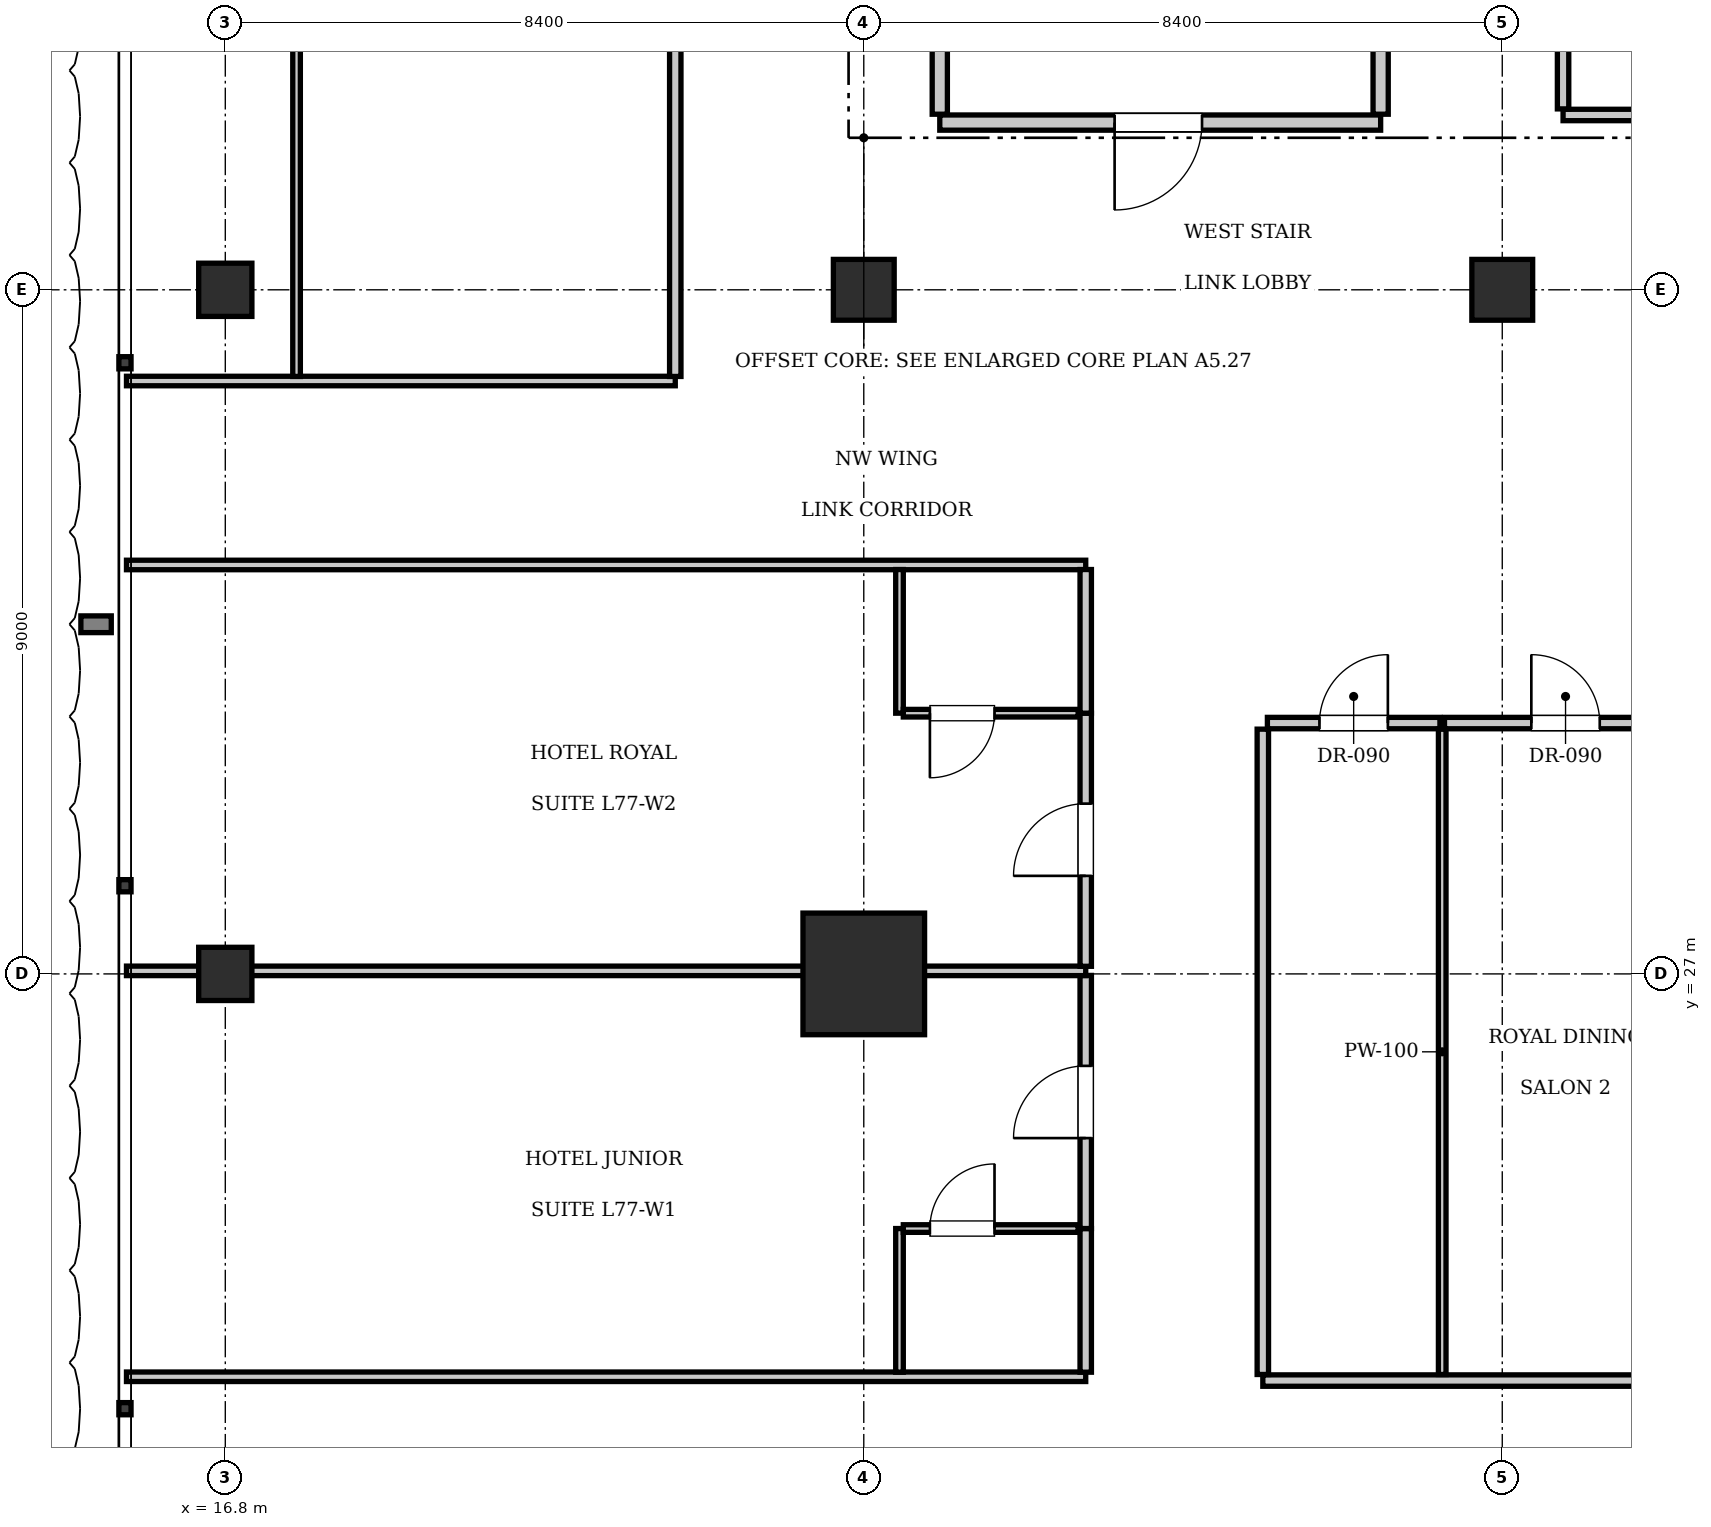
"""IFC4 building model, lengths in metres.
Left out: names, types, materials, properties, quantities, classifications, styles, units other than length and angle.
Written with IfcOpenShell. Run it as: python <this file> out.ifc"""

import sys

from ifc_helpers import new_model, si_unit, direction, frame, frame_2d, origin, origin_2d, place, context, subcontext, project, spatial, rectangle, extrude, element, fill, save


model = new_model("IFC4")
c1 = context("Model", 3, precision=1e-05, world=origin(), true_north=direction((0.0, 1.0)))
c2 = subcontext(c1, "Body", "Model", "MODEL_VIEW")
j1 = project(units=[si_unit("LENGTHUNIT", "METRE"), si_unit("PLANEANGLEUNIT", "RADIAN")], contexts=[c1])
p1 = place(None, origin())
s1 = spatial("IfcSite", under=j1, at=p1, CompositionType="ELEMENT")
p2 = place(p1, origin())
s2 = spatial("IfcBuilding", under=s1, at=p2, CompositionType="ELEMENT")
p3 = place(p2, frame((0.0, 0.0, 312.55)))
s3 = spatial("IfcBuildingStorey", under=s2, at=p3, CompositionType="ELEMENT", Elevation=312.55)
p4 = place(p3, frame((25.2, 27.0, 0.0), z_axis=(0.0, 0.0, 1.0), x_axis=(1.0, 0.0, 0.0)))
e1 = element("IfcColumn", 1, at=p4, inside=s3, PredefinedType="COLUMN", context=c2, shape_type="SweptSolid", body=[
    extrude(rectangle(XDim=1.6, YDim=1.6, at=origin_2d()), origin(), (0.0, 0.0, 1.0), 3.85),
])
for number, where, z_axis, x_axis in (
    (2, (25.2, 36.0, 0.0), (0.0, 0.0, 1.0), (1.0, 0.0, 0.0)),
    (3, (33.6, 36.0, 0.0), (0.0, 0.0, 1.0), (1.0, 0.0, 0.0)),
):
    element("IfcColumn", number, at=place(p3, frame(where, z_axis=z_axis, x_axis=x_axis)), inside=s3, PredefinedType="COLUMN", context=c2, shape_type="SweptSolid", body=[
        extrude(rectangle(XDim=0.8, YDim=0.8, at=origin_2d()), origin(), (0.0, 0.0, 1.0), 3.85),
    ])
for number, where, z_axis, x_axis in (
    (4, (16.8, 27.0, 0.0), (0.0, 0.0, 1.0), (1.0, 0.0, 0.0)),
    (5, (16.8, 36.0, 0.0), (0.0, 0.0, 1.0), (1.0, 0.0, 0.0)),
):
    element("IfcColumn", number, at=place(p3, frame(where, z_axis=z_axis, x_axis=x_axis)), inside=s3, PredefinedType="COLUMN", context=c2, shape_type="SweptSolid", body=[
        extrude(rectangle(XDim=0.7, YDim=0.7, at=origin_2d()), origin(), (0.0, 0.0, 1.0), 3.85),
    ])
p5 = place(p3, frame((26.2, 38.2, 0.0), z_axis=(0.0, 0.0, 1.0), x_axis=(1.0, 0.0, 0.0)))
e6 = element("IfcWall", 6, at=p5, inside=s3, PredefinedType="PARTITIONING", context=c2, shape_type="SweptSolid", body=[
    extrude(rectangle(XDim=5.8, YDim=0.2, at=frame_2d((2.9, 0.0))), origin(), (0.0, 0.0, 1.0), 3.55),
])
p6 = place(p5, frame((2.3, 0.0, 0.0)))
e7 = element("IfcOpeningElement", 7, at=p6, cuts=e6, PredefinedType="OPENING", context=c2, shape_type="SweptSolid", body=[
    extrude(rectangle(XDim=1.15, YDim=2.15, at=frame_2d((0.575, 1.075))), frame((0.0, 0.11, 0.0), z_axis=(0.0, -1.0, 0.0), x_axis=(1.0, 0.0, 0.0)), (0.0, 0.0, 1.0), 0.22),
])
for number, where, z_axis, x_axis in (
    (8, (26.2, 38.31, 0.0), (0.0, 0.0, 1.0), (0.0, 1.0, 0.0)),
    (9, (32.0, 38.31, 0.0), (0.0, 0.0, 1.0), (0.0, 1.0, 0.0)),
):
    element("IfcWall", number, at=place(p3, frame(where, z_axis=z_axis, x_axis=x_axis)), inside=s3, PredefinedType="PARTITIONING", context=c2, shape_type="SweptSolid", body=[
        extrude(rectangle(XDim=3.07, YDim=0.2, at=frame_2d((1.535, 0.0))), origin(), (0.0, 0.0, 1.0), 3.55),
    ])
p7 = place(p3, frame((34.4, 38.3, 0.0), z_axis=(0.0, 0.0, 1.0), x_axis=(1.0, 0.0, 0.0)))
e10 = element("IfcWall", 10, at=p7, inside=s3, PredefinedType="PARTITIONING", context=c2, shape_type="SweptSolid", body=[
    extrude(rectangle(XDim=2.88, YDim=0.15, at=frame_2d((1.44, 0.0))), origin(), (0.0, 0.0, 1.0), 3.55),
])
p8 = place(p7, frame((1.0, 0.0, 0.0)))
e11 = element("IfcOpeningElement", 11, at=p8, cuts=e10, PredefinedType="OPENING", context=c2, shape_type="SweptSolid", body=[
    extrude(rectangle(XDim=0.8, YDim=2.05, at=frame_2d((0.4, 1.025))), frame((0.0, 0.085, 0.0), z_axis=(0.0, -1.0, 0.0), x_axis=(1.0, 0.0, 0.0)), (0.0, 0.0, 1.0), 0.17),
])
p9 = place(p3, frame((34.4, 38.38, 0.0), z_axis=(0.0, 0.0, 1.0), x_axis=(0.0, 1.0, 0.0)))
e12 = element("IfcWall", 12, at=p9, inside=s3, PredefinedType="PARTITIONING", context=c2, shape_type="SweptSolid", body=[
    extrude(rectangle(XDim=2.84, YDim=0.15, at=frame_2d((1.42, 0.0))), origin(), (0.0, 0.0, 1.0), 3.55),
])
p10 = place(p3, frame((30.45, 21.65, 0.0), z_axis=(0.0, 0.0, 1.0), x_axis=(1.0, 0.0, 0.0)))
e13 = element("IfcWall", 13, at=p10, inside=s3, PredefinedType="PARTITIONING", context=c2, shape_type="SweptSolid", body=[
    extrude(rectangle(XDim=14.75, YDim=0.15, at=frame_2d((7.375, 0.0))), origin(), (0.0, 0.0, 1.0), 3.55),
])
p11 = place(p3, frame((30.45, 21.73, 0.0), z_axis=(0.0, 0.0, 1.0), x_axis=(0.0, 1.0, 0.0)))
e14 = element("IfcWall", 14, at=p11, inside=s3, PredefinedType="PARTITIONING", context=c2, shape_type="SweptSolid", body=[
    extrude(rectangle(XDim=8.49, YDim=0.15, at=frame_2d((4.245, 0.0))), origin(), (0.0, 0.0, 1.0), 3.55),
])
p12 = place(p3, frame((30.51, 30.3, 0.0), z_axis=(0.0, 0.0, 1.0), x_axis=(1.0, 0.0, 0.0)))
e15 = element("IfcWall", 15, at=p12, inside=s3, PredefinedType="PARTITIONING", context=c2, shape_type="SweptSolid", body=[
    extrude(rectangle(XDim=2.27, YDim=0.15, at=frame_2d((1.135, 0.0))), origin(), (0.0, 0.0, 1.0), 3.55),
])
p13 = place(p12, frame((0.685, 0.0, 0.0)))
e16 = element("IfcOpeningElement", 16, at=p13, cuts=e15, PredefinedType="OPENING", context=c2, shape_type="SweptSolid", body=[
    extrude(rectangle(XDim=0.9, YDim=2.1, at=frame_2d((0.45, 1.05))), frame((0.0, 0.085, 0.0), z_axis=(0.0, -1.0, 0.0), x_axis=(1.0, 0.0, 0.0)), (0.0, 0.0, 1.0), 0.17),
])
p14 = place(p3, frame((32.81, 21.73, 0.0), z_axis=(0.0, 0.0, 1.0), x_axis=(0.0, 1.0, 0.0)))
e17 = element("IfcWall", 17, at=p14, inside=s3, PredefinedType="PARTITIONING", context=c2, shape_type="SweptSolid", body=[
    extrude(rectangle(XDim=8.49, YDim=0.1, at=frame_2d((4.245, 0.0))), origin(), (0.0, 0.0, 1.0), 3.55),
])
p15 = place(p3, frame((32.84, 30.3, 0.0), z_axis=(0.0, 0.0, 1.0), x_axis=(1.0, 0.0, 0.0)))
e18 = element("IfcWall", 18, at=p15, inside=s3, PredefinedType="PARTITIONING", context=c2, shape_type="SweptSolid", body=[
    extrude(rectangle(XDim=3.185, YDim=0.15, at=frame_2d((1.592, 0.0))), origin(), (0.0, 0.0, 1.0), 3.55),
])
p16 = place(p15, frame((1.143, 0.0, 0.0)))
e19 = element("IfcOpeningElement", 19, at=p16, cuts=e18, PredefinedType="OPENING", context=c2, shape_type="SweptSolid", body=[
    extrude(rectangle(XDim=0.9, YDim=2.1, at=frame_2d((0.45, 1.05))), frame((0.0, 0.085, 0.0), z_axis=(0.0, -1.0, 0.0), x_axis=(1.0, 0.0, 0.0)), (0.0, 0.0, 1.0), 0.17),
])
for number, where, z_axis, x_axis in (
    (20, (15.5, 21.7, 0.0), (0.0, 0.0, 1.0), (1.0, 0.0, 0.0)),
    (21, (15.5, 32.38, 0.0), (0.0, 0.0, 1.0), (1.0, 0.0, 0.0)),
):
    element("IfcWall", number, at=place(p3, frame(where, z_axis=z_axis, x_axis=x_axis)), inside=s3, PredefinedType="PARTITIONING", context=c2, shape_type="SweptSolid", body=[
        extrude(rectangle(XDim=12.62, YDim=0.125, at=frame_2d((6.31, 0.0))), origin(), (0.0, 0.0, 1.0), 3.55),
    ])
p17 = place(p3, frame((28.12, 21.76, 0.0), z_axis=(0.0, 0.0, 1.0), x_axis=(0.0, 1.0, 0.0)))
e22 = element("IfcWall", 22, at=p17, inside=s3, PredefinedType="PARTITIONING", context=c2, shape_type="SweptSolid", body=[
    extrude(rectangle(XDim=1.89, YDim=0.15, at=frame_2d((0.945, 0.0))), origin(), (0.0, 0.0, 1.0), 3.55),
])
p18 = place(p3, frame((28.12, 23.65, 0.0), z_axis=(0.0, 0.0, 1.0), x_axis=(0.0, 1.0, 0.0)))
e23 = element("IfcWall", 23, at=p18, inside=s3, PredefinedType="PARTITIONING", context=c2, shape_type="SweptSolid", body=[
    extrude(rectangle(XDim=3.33, YDim=0.15, at=frame_2d((1.665, 0.0))), origin(), (0.0, 0.0, 1.0), 3.55),
])
p19 = place(p18, frame((1.19, 0.0, 0.0)))
e24 = element("IfcOpeningElement", 24, at=p19, cuts=e23, PredefinedType="OPENING", context=c2, shape_type="SweptSolid", body=[
    extrude(rectangle(XDim=0.95, YDim=2.15, at=frame_2d((0.475, 1.075))), frame((0.0, 0.085, 0.0), z_axis=(0.0, -1.0, 0.0), x_axis=(1.0, 0.0, 0.0)), (0.0, 0.0, 1.0), 0.17),
])
p20 = place(p3, frame((25.67, 21.76, 0.0), z_axis=(0.0, 0.0, 1.0), x_axis=(0.0, 1.0, 0.0)))
e25 = element("IfcWall", 25, at=p20, inside=s3, PredefinedType="PARTITIONING", context=c2, shape_type="SweptSolid", body=[
    extrude(rectangle(XDim=1.89, YDim=0.1, at=frame_2d((0.945, 0.0))), origin(), (0.0, 0.0, 1.0), 3.55),
])
p21 = place(p3, frame((25.72, 23.65, 0.0), z_axis=(0.0, 0.0, 1.0), x_axis=(1.0, 0.0, 0.0)))
e26 = element("IfcWall", 26, at=p21, inside=s3, PredefinedType="PARTITIONING", context=c2, shape_type="SweptSolid", body=[
    extrude(rectangle(XDim=2.3, YDim=0.1, at=frame_2d((1.15, 0.0))), origin(), (0.0, 0.0, 1.0), 3.55),
])
p22 = place(p21, frame((0.35, 0.0, 0.0)))
e27 = element("IfcOpeningElement", 27, at=p22, cuts=e26, PredefinedType="OPENING", context=c2, shape_type="SweptSolid", body=[
    extrude(rectangle(XDim=0.85, YDim=2.1, at=frame_2d((0.425, 1.05))), frame((0.0, 0.06, 0.0), z_axis=(0.0, -1.0, 0.0), x_axis=(1.0, 0.0, 0.0)), (0.0, 0.0, 1.0), 0.12),
])
p23 = place(p3, frame((15.5, 27.04, 0.0), z_axis=(0.0, 0.0, 1.0), x_axis=(1.0, 0.0, 0.0)))
e28 = element("IfcWall", 28, at=p23, inside=s3, PredefinedType="PARTITIONING", context=c2, shape_type="SweptSolid", body=[
    extrude(rectangle(XDim=12.62, YDim=0.125, at=frame_2d((6.31, 0.0))), origin(), (0.0, 0.0, 1.0), 2.35),
])
p24 = place(p3, frame((28.12, 27.1, 0.0), z_axis=(0.0, 0.0, 1.0), x_axis=(0.0, 1.0, 0.0)))
e29 = element("IfcWall", 29, at=p24, inside=s3, PredefinedType="PARTITIONING", context=c2, shape_type="SweptSolid", body=[
    extrude(rectangle(XDim=3.33, YDim=0.15, at=frame_2d((1.665, 0.0))), origin(), (0.0, 0.0, 1.0), 3.55),
])
p25 = place(p24, frame((1.19, 0.0, 0.0)))
e30 = element("IfcOpeningElement", 30, at=p25, cuts=e29, PredefinedType="OPENING", context=c2, shape_type="SweptSolid", body=[
    extrude(rectangle(XDim=0.95, YDim=2.15, at=frame_2d((0.475, 1.075))), frame((0.0, 0.085, 0.0), z_axis=(0.0, -1.0, 0.0), x_axis=(1.0, 0.0, 0.0)), (0.0, 0.0, 1.0), 0.17),
])
p26 = place(p3, frame((28.12, 30.43, 0.0), z_axis=(0.0, 0.0, 1.0), x_axis=(0.0, 1.0, 0.0)))
e31 = element("IfcWall", 31, at=p26, inside=s3, PredefinedType="PARTITIONING", context=c2, shape_type="SweptSolid", body=[
    extrude(rectangle(XDim=1.89, YDim=0.15, at=frame_2d((0.945, 0.0))), origin(), (0.0, 0.0, 1.0), 3.55),
])
p27 = place(p3, frame((25.67, 30.43, 0.0), z_axis=(0.0, 0.0, 1.0), x_axis=(0.0, 1.0, 0.0)))
e32 = element("IfcWall", 32, at=p27, inside=s3, PredefinedType="PARTITIONING", context=c2, shape_type="SweptSolid", body=[
    extrude(rectangle(XDim=1.89, YDim=0.1, at=frame_2d((0.945, 0.0))), origin(), (0.0, 0.0, 1.0), 3.55),
])
p28 = place(p3, frame((25.72, 30.43, 0.0), z_axis=(0.0, 0.0, 1.0), x_axis=(1.0, 0.0, 0.0)))
e33 = element("IfcWall", 33, at=p28, inside=s3, PredefinedType="PARTITIONING", context=c2, shape_type="SweptSolid", body=[
    extrude(rectangle(XDim=2.3, YDim=0.1, at=frame_2d((1.15, 0.0))), origin(), (0.0, 0.0, 1.0), 3.55),
])
p29 = place(p28, frame((0.35, 0.0, 0.0)))
e34 = element("IfcOpeningElement", 34, at=p29, cuts=e33, PredefinedType="OPENING", context=c2, shape_type="SweptSolid", body=[
    extrude(rectangle(XDim=0.85, YDim=2.1, at=frame_2d((0.425, 1.05))), frame((0.0, 0.06, 0.0), z_axis=(0.0, -1.0, 0.0), x_axis=(1.0, 0.0, 0.0)), (0.0, 0.0, 1.0), 0.12),
])
p30 = place(p3, frame((15.5, 34.8, 0.0), z_axis=(0.0, 0.0, 1.0), x_axis=(1.0, 0.0, 0.0)))
e35 = element("IfcWall", 35, at=p30, inside=s3, PredefinedType="PARTITIONING", context=c2, shape_type="SweptSolid", body=[
    extrude(rectangle(XDim=7.22, YDim=0.125, at=frame_2d((3.61, 0.0))), origin(), (0.0, 0.0, 1.0), 3.55),
])
p31 = place(p3, frame((22.72, 34.86, 0.0), z_axis=(0.0, 0.0, 1.0), x_axis=(0.0, 1.0, 0.0)))
e36 = element("IfcWall", 36, at=p31, inside=s3, PredefinedType="PARTITIONING", context=c2, shape_type="SweptSolid", body=[
    extrude(rectangle(XDim=11.527, YDim=0.15, at=frame_2d((5.764, 0.0))), origin(), (0.0, 0.0, 1.0), 3.55),
])
p32 = place(p31, frame((5.289, 0.0, 0.0)))
e37 = element("IfcOpeningElement", 37, at=p32, cuts=e36, PredefinedType="OPENING", context=c2, shape_type="SweptSolid", body=[
    extrude(rectangle(XDim=0.95, YDim=2.15, at=frame_2d((0.475, 1.075))), frame((0.0, 0.085, 0.0), z_axis=(0.0, -1.0, 0.0), x_axis=(1.0, 0.0, 0.0)), (0.0, 0.0, 1.0), 0.17),
])
p33 = place(p3, frame((17.738, 34.86, 0.0), z_axis=(0.0, 0.0, 1.0), x_axis=(0.0, 1.0, 0.0)))
e38 = element("IfcWall", 38, at=p33, inside=s3, PredefinedType="PARTITIONING", context=c2, shape_type="SweptSolid", body=[
    extrude(rectangle(XDim=13.938, YDim=0.1, at=frame_2d((6.969, 0.0))), origin(), (0.0, 0.0, 1.0), 3.55),
])
p34 = place(p33, frame((6.519, 0.0, 0.0)))
e39 = element("IfcOpeningElement", 39, at=p34, cuts=e38, PredefinedType="OPENING", context=c2, shape_type="SweptSolid", body=[
    extrude(rectangle(XDim=0.9, YDim=2.1, at=frame_2d((0.45, 1.05))), frame((0.0, 0.06, 0.0), z_axis=(0.0, -1.0, 0.0), x_axis=(1.0, 0.0, 0.0)), (0.0, 0.0, 1.0), 0.12),
])
p35 = place(p6, frame((1.15, 0.0, 0.0), z_axis=(0.0, 0.0, 1.0), x_axis=(-1.0, 0.0, 0.0)))
e40 = element("IfcDoor", 40, at=p35, inside=s3, OperationType="SINGLE_SWING_RIGHT", PredefinedType="DOOR", context=c2, shape_type="SweptSolid", body=[
    extrude(rectangle(XDim=1.15, YDim=2.15, at=frame_2d((0.575, 1.075))), frame((0.0, 0.025, 0.0), z_axis=(0.0, -1.0, 0.0), x_axis=(1.0, 0.0, 0.0)), (0.0, 0.0, 1.0), 0.05),
])
fill(e7, e40)
p36 = place(p13, origin())
e41 = element("IfcDoor", 41, at=p36, inside=s3, OperationType="SINGLE_SWING_RIGHT", PredefinedType="DOOR", context=c2, shape_type="SweptSolid", body=[
    extrude(rectangle(XDim=0.9, YDim=2.1, at=frame_2d((0.45, 1.05))), frame((0.0, 0.025, 0.0), z_axis=(0.0, -1.0, 0.0), x_axis=(1.0, 0.0, 0.0)), (0.0, 0.0, 1.0), 0.05),
])
fill(e16, e41)
p37 = place(p16, origin())
e42 = element("IfcDoor", 42, at=p37, inside=s3, OperationType="SINGLE_SWING_LEFT", PredefinedType="DOOR", context=c2, shape_type="SweptSolid", body=[
    extrude(rectangle(XDim=0.9, YDim=2.1, at=frame_2d((0.45, 1.05))), frame((0.0, 0.025, 0.0), z_axis=(0.0, -1.0, 0.0), x_axis=(1.0, 0.0, 0.0)), (0.0, 0.0, 1.0), 0.05),
])
fill(e19, e42)
p38 = place(p22, origin())
e43 = element("IfcDoor", 43, at=p38, inside=s3, OperationType="SINGLE_SWING_RIGHT", PredefinedType="DOOR", context=c2, shape_type="SweptSolid", body=[
    extrude(rectangle(XDim=0.85, YDim=2.1, at=frame_2d((0.425, 1.05))), frame((0.0, 0.025, 0.0), z_axis=(0.0, -1.0, 0.0), x_axis=(1.0, 0.0, 0.0)), (0.0, 0.0, 1.0), 0.05),
])
fill(e27, e43)
p39 = place(p19, origin())
e44 = element("IfcDoor", 44, at=p39, inside=s3, OperationType="SINGLE_SWING_LEFT", PredefinedType="DOOR", context=c2, shape_type="SweptSolid", body=[
    extrude(rectangle(XDim=0.95, YDim=2.15, at=frame_2d((0.475, 1.075))), frame((0.0, 0.025, 0.0), z_axis=(0.0, -1.0, 0.0), x_axis=(1.0, 0.0, 0.0)), (0.0, 0.0, 1.0), 0.05),
])
fill(e24, e44)
p40 = place(p29, frame((0.85, 0.0, 0.0), z_axis=(0.0, 0.0, 1.0), x_axis=(-1.0, 0.0, 0.0)))
e45 = element("IfcDoor", 45, at=p40, inside=s3, OperationType="SINGLE_SWING_RIGHT", PredefinedType="DOOR", context=c2, shape_type="SweptSolid", body=[
    extrude(rectangle(XDim=0.85, YDim=2.1, at=frame_2d((0.425, 1.05))), frame((0.0, 0.025, 0.0), z_axis=(0.0, -1.0, 0.0), x_axis=(1.0, 0.0, 0.0)), (0.0, 0.0, 1.0), 0.05),
])
fill(e34, e45)
p41 = place(p25, origin())
e46 = element("IfcDoor", 46, at=p41, inside=s3, OperationType="SINGLE_SWING_LEFT", PredefinedType="DOOR", context=c2, shape_type="SweptSolid", body=[
    extrude(rectangle(XDim=0.95, YDim=2.15, at=frame_2d((0.475, 1.075))), frame((0.0, 0.025, 0.0), z_axis=(0.0, -1.0, 0.0), x_axis=(1.0, 0.0, 0.0)), (0.0, 0.0, 1.0), 0.05),
])
fill(e30, e46)
save(model, sys.argv[1])
